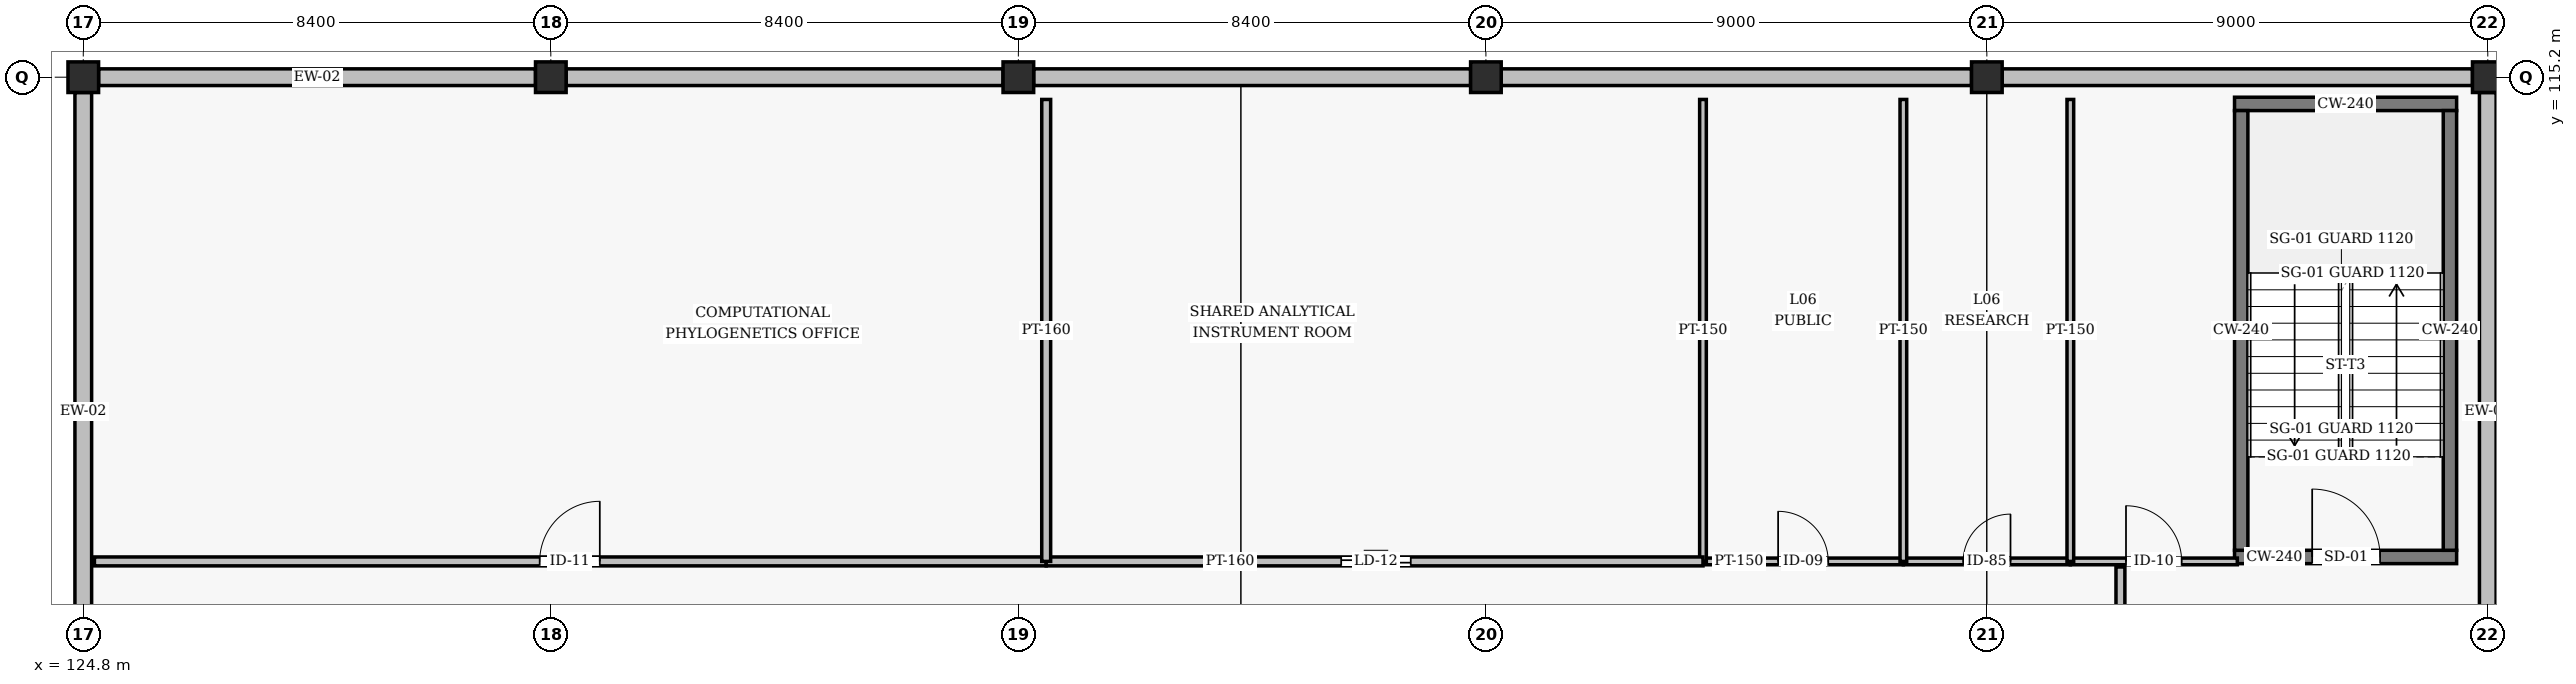
"""IFC4 building model, lengths in metres.
Left out: names, types, materials, properties, quantities, classifications, styles, units other than length and angle.
Written with IfcOpenShell. Run it as: python <this file> out.ifc"""

import sys

from ifc_helpers import new_model, si_unit, direction, frame, frame_2d, origin, origin_2d, place, context, subcontext, project, spatial, rectangle, hollow_rectangle, extrude, element, fill, save


model = new_model("IFC4")
c1 = context("Model", 3, precision=1e-05, world=origin(), true_north=direction((0.0, 1.0)))
c2 = subcontext(c1, "Body", "Model", "MODEL_VIEW")
j1 = project(units=[si_unit("LENGTHUNIT", "METRE"), si_unit("PLANEANGLEUNIT", "RADIAN")], contexts=[c1])
p1 = place(None, origin())
s1 = spatial("IfcSite", under=j1, at=p1, CompositionType="ELEMENT")
p2 = place(p1, origin())
s2 = spatial("IfcBuilding", under=s1, at=p2, CompositionType="ELEMENT")
p3 = place(p2, frame((0.0, 0.0, 24.6)))
s3 = spatial("IfcBuildingStorey", under=s2, at=p3, CompositionType="ELEMENT", Elevation=24.6)
for number, where, z_axis, x_axis in (
    (1, (124.8, 115.2, 0.0), (0.0, 0.0, 1.0), (1.0, 0.0, 0.0)),
    (2, (133.2, 115.2, 0.0), (0.0, 0.0, 1.0), (1.0, 0.0, 0.0)),
    (3, (141.6, 115.2, 0.0), (0.0, 0.0, 1.0), (1.0, 0.0, 0.0)),
    (4, (150.0, 115.2, 0.0), (0.0, 0.0, 1.0), (1.0, 0.0, 0.0)),
    (5, (159.0, 115.2, 0.0), (0.0, 0.0, 1.0), (1.0, 0.0, 0.0)),
    (6, (168.0, 115.2, 0.0), (0.0, 0.0, 1.0), (1.0, 0.0, 0.0)),
):
    element("IfcColumn", number, at=place(p3, frame(where, z_axis=z_axis, x_axis=x_axis)), inside=s3, PredefinedType="COLUMN", context=c2, shape_type="SweptSolid", body=[
        extrude(hollow_rectangle(XDim=0.55, YDim=0.55, WallThickness=0.022, InnerFilletRadius=0.022, OuterFilletRadius=0.044, at=origin_2d()), origin(), (0.0, 0.0, 1.0), 3.6),
    ])
p4 = place(p3, frame((168.0, 103.475, 0.0), z_axis=(0.0, 0.0, 1.0), x_axis=(0.0, 1.0, 0.0)))
e7 = element("IfcWall", 7, at=p4, inside=s3, PredefinedType="SOLIDWALL", context=c2, shape_type="SweptSolid", body=[
    extrude(rectangle(XDim=11.45, YDim=0.3, at=frame_2d((5.725, 0.0))), origin(), (0.0, 0.0, 1.0), 2.553),
])
for number, where, z_axis, x_axis in (
    (8, (167.725, 115.2, 0.0), (0.0, 0.0, 1.0), (-1.0, 0.0, 0.0)),
    (9, (158.725, 115.2, 0.0), (0.0, 0.0, 1.0), (-1.0, 0.0, 0.0)),
):
    element("IfcWall", number, at=place(p3, frame(where, z_axis=z_axis, x_axis=x_axis)), inside=s3, PredefinedType="SOLIDWALL", context=c2, shape_type="SweptSolid", body=[
        extrude(rectangle(XDim=8.45, YDim=0.3, at=frame_2d((4.225, 0.0))), origin(), (0.0, 0.0, 1.0), 2.553),
    ])
p5 = place(p3, frame((149.725, 115.2, 0.0), z_axis=(0.0, 0.0, 1.0), x_axis=(-1.0, 0.0, 0.0)))
e10 = element("IfcWall", 10, at=p5, inside=s3, PredefinedType="SOLIDWALL", context=c2, shape_type="SweptSolid", body=[
    extrude(rectangle(XDim=7.85, YDim=0.3, at=frame_2d((3.925, 0.0))), origin(), (0.0, 0.0, 1.0), 2.845),
])
p6 = place(p3, frame((141.325, 115.2, 0.0), z_axis=(0.0, 0.0, 1.0), x_axis=(-1.0, 0.0, 0.0)))
e11 = element("IfcWall", 11, at=p6, inside=s3, PredefinedType="SOLIDWALL", context=c2, shape_type="SweptSolid", body=[
    extrude(rectangle(XDim=7.85, YDim=0.3, at=frame_2d((3.925, 0.0))), origin(), (0.0, 0.0, 1.0), 2.845),
])
p7 = place(p3, frame((132.925, 115.2, 0.0), z_axis=(0.0, 0.0, 1.0), x_axis=(-1.0, 0.0, 0.0)))
e12 = element("IfcWall", 12, at=p7, inside=s3, PredefinedType="SOLIDWALL", context=c2, shape_type="SweptSolid", body=[
    extrude(rectangle(XDim=7.85, YDim=0.3, at=frame_2d((3.925, 0.0))), origin(), (0.0, 0.0, 1.0), 2.845),
])
p8 = place(p3, frame((124.8, 114.925, 0.0), z_axis=(0.0, 0.0, 1.0), x_axis=(0.0, -1.0, 0.0)))
e13 = element("IfcWall", 13, at=p8, inside=s3, PredefinedType="SOLIDWALL", context=c2, shape_type="SweptSolid", body=[
    extrude(rectangle(XDim=11.45, YDim=0.3, at=frame_2d((5.725, 0.0))), origin(), (0.0, 0.0, 1.0), 2.553),
])
p9 = place(p3, frame((163.45, 106.58, 0.0), z_axis=(0.0, 0.0, 1.0), x_axis=(1.0, 0.0, 0.0)))
e14 = element("IfcWall", 14, at=p9, inside=s3, PredefinedType="SHEAR", context=c2, shape_type="SweptSolid", body=[
    extrude(rectangle(XDim=3.99, YDim=0.24, at=frame_2d((1.995, 0.0))), origin(), (0.0, 0.0, 1.0), 3.345),
])
p10 = place(p9, frame((1.395, 0.0, 0.0)))
e15 = element("IfcOpeningElement", 15, at=p10, cuts=e14, PredefinedType="OPENING", context=c2, shape_type="SweptSolid", body=[
    extrude(rectangle(XDim=1.22, YDim=2.18, at=frame_2d((0.61, 1.09))), frame((0.0, 0.13, 0.0), z_axis=(0.0, -1.0, 0.0), x_axis=(1.0, 0.0, 0.0)), (0.0, 0.0, 1.0), 0.26),
])
p11 = place(p3, frame((163.45, 114.72, 0.0), z_axis=(0.0, 0.0, 1.0), x_axis=(1.0, 0.0, 0.0)))
e16 = element("IfcWall", 16, at=p11, inside=s3, PredefinedType="SHEAR", context=c2, shape_type="SweptSolid", body=[
    extrude(rectangle(XDim=3.99, YDim=0.24, at=frame_2d((1.995, 0.0))), origin(), (0.0, 0.0, 1.0), 3.345),
])
for number, where, z_axis, x_axis in (
    (17, (163.57, 106.7, 0.0), (0.0, 0.0, 1.0), (0.0, 1.0, 0.0)),
    (18, (167.32, 106.7, 0.0), (0.0, 0.0, 1.0), (0.0, 1.0, 0.0)),
):
    element("IfcWall", number, at=place(p3, frame(where, z_axis=z_axis, x_axis=x_axis)), inside=s3, PredefinedType="SHEAR", context=c2, shape_type="SweptSolid", body=[
        extrude(rectangle(XDim=7.9, YDim=0.24, at=frame_2d((3.95, 0.0))), origin(), (0.0, 0.0, 1.0), 3.345),
    ])
p12 = place(p3, frame((153.9, 106.5, 0.0), z_axis=(0.0, 0.0, 1.0), x_axis=(1.0, 0.0, 0.0)))
e19 = element("IfcWall", 19, at=p12, inside=s3, PredefinedType="PARTITIONING", context=c2, shape_type="SweptSolid", body=[
    extrude(rectangle(XDim=3.6, YDim=0.12, at=frame_2d((1.8, 0.0))), origin(), (0.0, 0.0, 1.0), 3.345),
])
p13 = place(p12, frame((1.35, 0.0, 0.0)))
e20 = element("IfcOpeningElement", 20, at=p13, cuts=e19, PredefinedType="OPENING", context=c2, shape_type="SweptSolid", body=[
    extrude(rectangle(XDim=0.9, YDim=2.1, at=frame_2d((0.45, 1.05))), frame((0.0, 0.07, 0.0), z_axis=(0.0, -1.0, 0.0), x_axis=(1.0, 0.0, 0.0)), (0.0, 0.0, 1.0), 0.14),
])
p14 = place(p3, frame((157.5, 106.5, 0.0), z_axis=(0.0, 0.0, 1.0), x_axis=(1.0, 0.0, 0.0)))
e21 = element("IfcWall", 21, at=p14, inside=s3, PredefinedType="PARTITIONING", context=c2, shape_type="SweptSolid", body=[
    extrude(rectangle(XDim=3.0, YDim=0.12, at=frame_2d((1.5, 0.0))), origin(), (0.0, 0.0, 1.0), 2.595),
])
p15 = place(p14, frame((1.075, 0.0, 0.0)))
e22 = element("IfcOpeningElement", 22, at=p15, cuts=e21, PredefinedType="OPENING", context=c2, shape_type="SweptSolid", body=[
    extrude(rectangle(XDim=0.85, YDim=2.1, at=frame_2d((0.425, 1.05))), frame((0.0, 0.07, 0.0), z_axis=(0.0, -1.0, 0.0), x_axis=(1.0, 0.0, 0.0)), (0.0, 0.0, 1.0), 0.14),
])
p16 = place(p3, frame((160.5, 106.5, 0.0), z_axis=(0.0, 0.0, 1.0), x_axis=(1.0, 0.0, 0.0)))
e23 = element("IfcWall", 23, at=p16, inside=s3, PredefinedType="PARTITIONING", context=c2, shape_type="SweptSolid", body=[
    extrude(rectangle(XDim=3.0, YDim=0.12, at=frame_2d((1.5, 0.0))), origin(), (0.0, 0.0, 1.0), 3.345),
])
p17 = place(p16, frame((1.0, 0.0, 0.0)))
e24 = element("IfcOpeningElement", 24, at=p17, cuts=e23, PredefinedType="OPENING", context=c2, shape_type="SweptSolid", body=[
    extrude(rectangle(XDim=1.0, YDim=2.1, at=frame_2d((0.5, 1.05))), frame((0.0, 0.07, 0.0), z_axis=(0.0, -1.0, 0.0), x_axis=(1.0, 0.0, 0.0)), (0.0, 0.0, 1.0), 0.14),
])
for number, where, z_axis, x_axis in (
    (25, (153.9, 106.5, 0.0), (0.0, 0.0, 1.0), (0.0, 1.0, 0.0)),
    (26, (157.5, 106.5, 0.0), (0.0, 0.0, 1.0), (0.0, 1.0, 0.0)),
):
    element("IfcWall", number, at=place(p3, frame(where, z_axis=z_axis, x_axis=x_axis)), inside=s3, PredefinedType="PARTITIONING", context=c2, shape_type="SweptSolid", body=[
        extrude(rectangle(XDim=8.3, YDim=0.12, at=frame_2d((4.15, 0.0))), origin(), (0.0, 0.0, 1.0), 2.945),
    ])
p18 = place(p3, frame((160.5, 106.5, 0.0), z_axis=(0.0, 0.0, 1.0), x_axis=(0.0, 1.0, 0.0)))
e27 = element("IfcWall", 27, at=p18, inside=s3, PredefinedType="PARTITIONING", context=c2, shape_type="SweptSolid", body=[
    extrude(rectangle(XDim=8.3, YDim=0.12, at=frame_2d((4.15, 0.0))), origin(), (0.0, 0.0, 1.0), 3.345),
])
p19 = place(p3, frame((161.4, 92.3, 0.0), z_axis=(0.0, 0.0, 1.0), x_axis=(0.0, 1.0, 0.0)))
e28 = element("IfcWall", 28, at=p19, inside=s3, PredefinedType="PARTITIONING", context=c2, shape_type="SweptSolid", body=[
    extrude(rectangle(XDim=14.1, YDim=0.16, at=frame_2d((7.05, 0.0))), origin(), (0.0, 0.0, 1.0), 2.745),
])
p20 = place(p19, frame((6.5, 0.0, 0.0)))
e29 = element("IfcOpeningElement", 29, at=p20, cuts=e28, PredefinedType="OPENING", context=c2, shape_type="SweptSolid", body=[
    extrude(rectangle(XDim=1.08, YDim=2.08, at=frame_2d((0.54, 1.04))), frame((0.0, 0.09, 0.0), z_axis=(0.0, -1.0, 0.0), x_axis=(1.0, 0.0, 0.0)), (0.0, 0.0, 1.0), 0.18),
])
p21 = place(p3, frame((125.0, 106.5, 0.0), z_axis=(0.0, 0.0, 1.0), x_axis=(1.0, 0.0, 0.0)))
e30 = element("IfcWall", 30, at=p21, inside=s3, PredefinedType="PARTITIONING", context=c2, shape_type="SweptSolid", body=[
    extrude(rectangle(XDim=17.1, YDim=0.16, at=frame_2d((8.55, 0.0))), origin(), (0.0, 0.0, 1.0), 2.595),
])
p22 = place(p21, frame((8.0, 0.0, 0.0)))
e31 = element("IfcOpeningElement", 31, at=p22, cuts=e30, PredefinedType="OPENING", context=c2, shape_type="SweptSolid", body=[
    extrude(rectangle(XDim=1.08, YDim=2.08, at=frame_2d((0.54, 1.04))), frame((0.0, 0.09, 0.0), z_axis=(0.0, -1.0, 0.0), x_axis=(1.0, 0.0, 0.0)), (0.0, 0.0, 1.0), 0.18),
])
p23 = place(p3, frame((142.1, 106.5, 0.0), z_axis=(0.0, 0.0, 1.0), x_axis=(1.0, 0.0, 0.0)))
e32 = element("IfcWall", 32, at=p23, inside=s3, PredefinedType="PARTITIONING", context=c2, shape_type="SweptSolid", body=[
    extrude(rectangle(XDim=11.8, YDim=0.16, at=frame_2d((5.9, 0.0))), origin(), (0.0, 0.0, 1.0), 2.595),
])
p24 = place(p23, frame((5.3, 0.0, 0.0)))
e33 = element("IfcOpeningElement", 33, at=p24, cuts=e32, PredefinedType="OPENING", context=c2, shape_type="SweptSolid", body=[
    extrude(rectangle(XDim=1.25, YDim=2.12, at=frame_2d((0.625, 1.06))), frame((0.0, 0.09, 0.0), z_axis=(0.0, -1.0, 0.0), x_axis=(1.0, 0.0, 0.0)), (0.0, 0.0, 1.0), 0.18),
])
p25 = place(p3, frame((142.1, 106.5, 0.0), z_axis=(0.0, 0.0, 1.0), x_axis=(0.0, 1.0, 0.0)))
e34 = element("IfcWall", 34, at=p25, inside=s3, PredefinedType="PARTITIONING", context=c2, shape_type="SweptSolid", body=[
    extrude(rectangle(XDim=8.3, YDim=0.16, at=frame_2d((4.15, 0.0))), origin(), (0.0, 0.0, 1.0), 2.995),
])
p26 = place(p10, origin())
e35 = element("IfcDoor", 35, at=p26, inside=s3, OperationType="SINGLE_SWING_LEFT", PredefinedType="DOOR", context=c2, shape_type="SweptSolid", body=[
    extrude(rectangle(XDim=1.22, YDim=2.18, at=frame_2d((0.61, 1.09))), frame((0.0, 0.025, 0.0), z_axis=(0.0, -1.0, 0.0), x_axis=(1.0, 0.0, 0.0)), (0.0, 0.0, 1.0), 0.05),
])
fill(e15, e35)
p27 = place(p13, origin())
e36 = element("IfcDoor", 36, at=p27, inside=s3, OperationType="SINGLE_SWING_LEFT", PredefinedType="DOOR", context=c2, shape_type="SweptSolid", body=[
    extrude(rectangle(XDim=0.9, YDim=2.1, at=frame_2d((0.45, 1.05))), frame((0.0, 0.025, 0.0), z_axis=(0.0, -1.0, 0.0), x_axis=(1.0, 0.0, 0.0)), (0.0, 0.0, 1.0), 0.05),
])
fill(e20, e36)
p28 = place(p15, origin())
e37 = element("IfcDoor", 37, at=p28, inside=s3, OperationType="SINGLE_SWING_RIGHT", PredefinedType="DOOR", context=c2, shape_type="SweptSolid", body=[
    extrude(rectangle(XDim=0.85, YDim=2.1, at=frame_2d((0.425, 1.05))), frame((0.0, 0.025, 0.0), z_axis=(0.0, -1.0, 0.0), x_axis=(1.0, 0.0, 0.0)), (0.0, 0.0, 1.0), 0.05),
])
fill(e22, e37)
p29 = place(p17, origin())
e38 = element("IfcDoor", 38, at=p29, inside=s3, OperationType="SINGLE_SWING_LEFT", PredefinedType="DOOR", context=c2, shape_type="SweptSolid", body=[
    extrude(rectangle(XDim=1.0, YDim=2.1, at=frame_2d((0.5, 1.05))), frame((0.0, 0.025, 0.0), z_axis=(0.0, -1.0, 0.0), x_axis=(1.0, 0.0, 0.0)), (0.0, 0.0, 1.0), 0.05),
])
fill(e24, e38)
p30 = place(p22, origin())
e39 = element("IfcDoor", 39, at=p30, inside=s3, OperationType="SINGLE_SWING_RIGHT", PredefinedType="DOOR", context=c2, shape_type="SweptSolid", body=[
    extrude(rectangle(XDim=1.08, YDim=2.08, at=frame_2d((0.54, 1.04))), frame((0.0, 0.025, 0.0), z_axis=(0.0, -1.0, 0.0), x_axis=(1.0, 0.0, 0.0)), (0.0, 0.0, 1.0), 0.05),
])
fill(e31, e39)
p31 = place(p24, origin())
e40 = element("IfcDoor", 40, at=p31, inside=s3, OperationType="SINGLE_SWING_LEFT", PredefinedType="DOOR", context=c2, shape_type="SweptSolid", body=[
    extrude(rectangle(XDim=1.25, YDim=2.12, at=frame_2d((0.625, 1.06))), frame((0.0, 0.025, 0.0), z_axis=(0.0, -1.0, 0.0), x_axis=(1.0, 0.0, 0.0)), (0.0, 0.0, 1.0), 0.05),
])
fill(e33, e40)
save(model, sys.argv[1])
